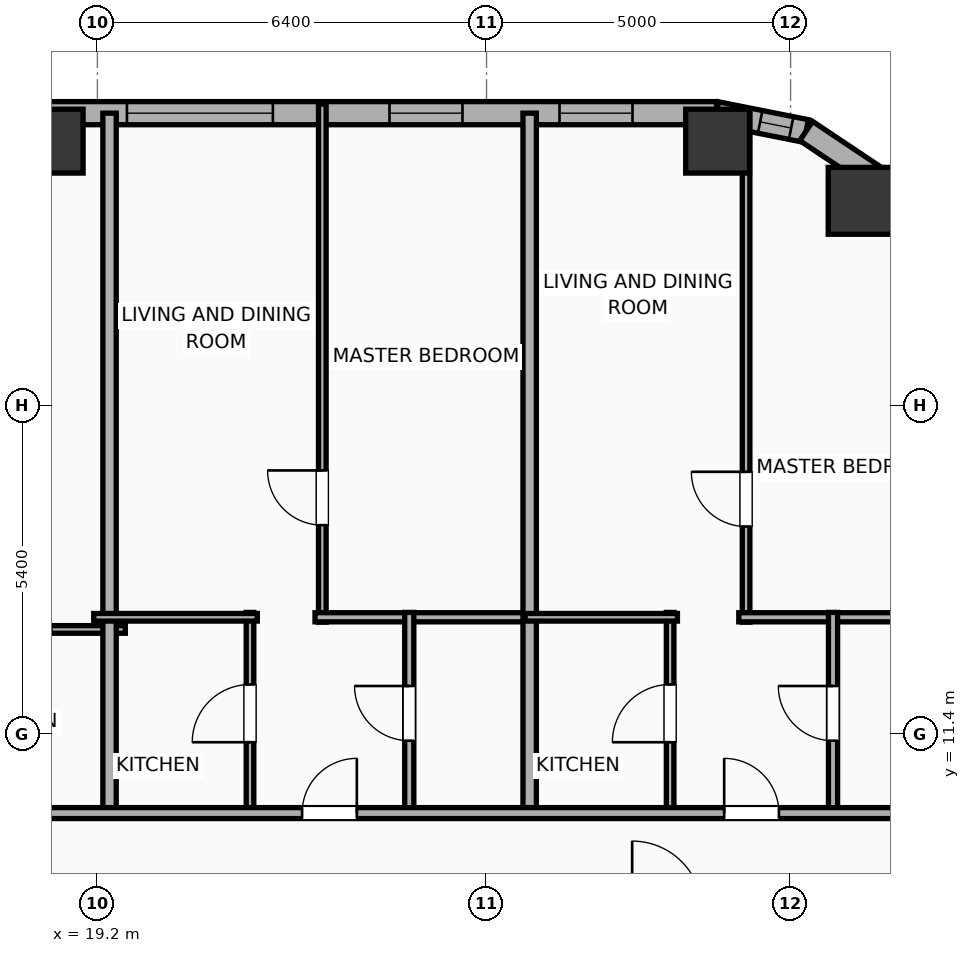
"""IFC4 building model, lengths in metres.
Left out: names, types, materials, properties, quantities, classifications, styles, units other than length and angle.
Written with IfcOpenShell. Run it as: python <this file> out.ifc"""

import sys

from ifc_helpers import new_model, si_unit, direction, frame, frame_2d, origin, origin_2d, place, context, subcontext, project, spatial, rectangle, hollow_rectangle, hollow_circle, extrude, element, fill, save


model = new_model("IFC4")
c1 = context("Model", 3, precision=1e-05, world=origin(), true_north=direction((0.0, 1.0)))
c2 = subcontext(c1, "Body", "Model", "MODEL_VIEW")
j1 = project(units=[si_unit("LENGTHUNIT", "METRE"), si_unit("PLANEANGLEUNIT", "RADIAN")], contexts=[c1])
p1 = place(None, origin())
s1 = spatial("IfcSite", under=j1, at=p1, CompositionType="ELEMENT")
p2 = place(p1, origin())
s2 = spatial("IfcBuilding", under=s1, at=p2, CompositionType="ELEMENT")
p3 = place(p2, frame((0.0, 0.0, 101.4)))
s3 = spatial("IfcBuildingStorey", under=s2, at=p3, CompositionType="ELEMENT", Elevation=101.4)
p4 = place(p3, frame((31.769, 20.169, 0.0), z_axis=(0.0, 0.0, 1.0), x_axis=(1.0, 0.0, 0.0)))
e1 = element("IfcColumn", 1, at=p4, inside=s3, PredefinedType="COLUMN", context=c2, shape_type="SweptSolid", body=[
    extrude(hollow_circle(Radius=0.55, WallThickness=0.036, at=origin_2d()), origin(), (0.0, 0.0, 1.0), 3.9),
])
for number, where, z_axis, x_axis in (
    (2, (29.4, 21.15, 0.0), (0.0, 0.0, 1.0), (1.0, 0.0, 0.0)),
    (3, (18.44, 21.15, 0.0), (0.0, 0.0, 1.0), (1.0, 0.0, 0.0)),
):
    element("IfcColumn", number, at=place(p3, frame(where, z_axis=z_axis, x_axis=x_axis)), inside=s3, PredefinedType="COLUMN", context=c2, shape_type="SweptSolid", body=[
        extrude(hollow_rectangle(XDim=1.05, YDim=1.05, WallThickness=0.036, at=origin_2d()), origin(), (0.0, 0.0, 1.0), 3.9),
    ])
p5 = place(p3, frame((-25.381, 21.61, 0.0), z_axis=(0.0, 0.0, 1.0), x_axis=(1.0, 0.0, 0.0)))
e4 = element("IfcWall", 4, at=p5, inside=s3, PredefinedType="ELEMENTEDWALL", context=c2, shape_type="SweptSolid", body=[
    extrude(rectangle(XDim=54.763, YDim=0.38, at=frame_2d((27.381, 0.0))), origin(), (0.0, 0.0, 1.0), 3.65),
])
p6 = place(p5, frame((45.067, 0.0, 0.75)))
e5 = element("IfcOpeningElement", 5, at=p6, cuts=e4, PredefinedType="OPENING", context=c2, shape_type="SweptSolid", body=[
    extrude(rectangle(XDim=2.4, YDim=2.1, at=frame_2d((1.2, 1.05))), frame((0.0, 0.2, 0.0), z_axis=(0.0, -1.0, 0.0), x_axis=(1.0, 0.0, 0.0)), (0.0, 0.0, 1.0), 0.4),
])
p7 = place(p5, frame((4.076, 0.0, 0.75)))
e6 = element("IfcOpeningElement", 6, at=p7, cuts=e4, PredefinedType="OPENING", context=c2, shape_type="SweptSolid", body=[
    extrude(rectangle(XDim=1.2, YDim=2.05, at=frame_2d((0.6, 1.025))), frame((0.0, 0.2, 0.0), z_axis=(0.0, -1.0, 0.0), x_axis=(1.0, 0.0, 0.0)), (0.0, 0.0, 1.0), 0.4),
])
p8 = place(p5, frame((9.395, 0.0, 0.75)))
e7 = element("IfcOpeningElement", 7, at=p8, cuts=e4, PredefinedType="OPENING", context=c2, shape_type="SweptSolid", body=[
    extrude(rectangle(XDim=0.85, YDim=2.05, at=frame_2d((0.425, 1.025))), frame((0.0, 0.2, 0.0), z_axis=(0.0, -1.0, 0.0), x_axis=(1.0, 0.0, 0.0)), (0.0, 0.0, 1.0), 0.4),
])
p9 = place(p5, frame((7.205, 0.0, 0.75)))
e8 = element("IfcOpeningElement", 8, at=p9, cuts=e4, PredefinedType="OPENING", context=c2, shape_type="SweptSolid", body=[
    extrude(rectangle(XDim=1.2, YDim=2.05, at=frame_2d((0.6, 1.025))), frame((0.0, 0.2, 0.0), z_axis=(0.0, -1.0, 0.0), x_axis=(1.0, 0.0, 0.0)), (0.0, 0.0, 1.0), 0.4),
])
p10 = place(p5, frame((13.676, 0.0, 0.75)))
e9 = element("IfcOpeningElement", 9, at=p10, cuts=e4, PredefinedType="OPENING", context=c2, shape_type="SweptSolid", body=[
    extrude(rectangle(XDim=1.2, YDim=2.05, at=frame_2d((0.6, 1.025))), frame((0.0, 0.2, 0.0), z_axis=(0.0, -1.0, 0.0), x_axis=(1.0, 0.0, 0.0)), (0.0, 0.0, 1.0), 0.4),
])
p11 = place(p5, frame((17.136, 0.0, 0.75)))
e10 = element("IfcOpeningElement", 10, at=p11, cuts=e4, PredefinedType="OPENING", context=c2, shape_type="SweptSolid", body=[
    extrude(rectangle(XDim=1.2, YDim=2.05, at=frame_2d((0.6, 1.025))), frame((0.0, 0.2, 0.0), z_axis=(0.0, -1.0, 0.0), x_axis=(1.0, 0.0, 0.0)), (0.0, 0.0, 1.0), 0.4),
])
p12 = place(p5, frame((22.656, 0.0, 0.75)))
e11 = element("IfcOpeningElement", 11, at=p12, cuts=e4, PredefinedType="OPENING", context=c2, shape_type="SweptSolid", body=[
    extrude(rectangle(XDim=1.2, YDim=2.05, at=frame_2d((0.6, 1.025))), frame((0.0, 0.2, 0.0), z_axis=(0.0, -1.0, 0.0), x_axis=(1.0, 0.0, 0.0)), (0.0, 0.0, 1.0), 0.4),
])
p13 = place(p5, frame((29.443, 0.0, 0.75)))
e12 = element("IfcOpeningElement", 12, at=p13, cuts=e4, PredefinedType="OPENING", context=c2, shape_type="SweptSolid", body=[
    extrude(rectangle(XDim=1.2, YDim=2.05, at=frame_2d((0.6, 1.025))), frame((0.0, 0.2, 0.0), z_axis=(0.0, -1.0, 0.0), x_axis=(1.0, 0.0, 0.0)), (0.0, 0.0, 1.0), 0.4),
])
p14 = place(p5, frame((26.348, 0.0, 0.75)))
e13 = element("IfcOpeningElement", 13, at=p14, cuts=e4, PredefinedType="OPENING", context=c2, shape_type="SweptSolid", body=[
    extrude(rectangle(XDim=1.2, YDim=2.05, at=frame_2d((0.6, 1.025))), frame((0.0, 0.2, 0.0), z_axis=(0.0, -1.0, 0.0), x_axis=(1.0, 0.0, 0.0)), (0.0, 0.0, 1.0), 0.4),
])
p15 = place(p5, frame((33.596, 0.0, 0.75)))
e14 = element("IfcOpeningElement", 14, at=p15, cuts=e4, PredefinedType="OPENING", context=c2, shape_type="SweptSolid", body=[
    extrude(rectangle(XDim=1.2, YDim=2.05, at=frame_2d((0.6, 1.025))), frame((0.0, 0.2, 0.0), z_axis=(0.0, -1.0, 0.0), x_axis=(1.0, 0.0, 0.0)), (0.0, 0.0, 1.0), 0.4),
])
p16 = place(p5, frame((36.014, 0.0, 0.75)))
e15 = element("IfcOpeningElement", 15, at=p16, cuts=e4, PredefinedType="OPENING", context=c2, shape_type="SweptSolid", body=[
    extrude(rectangle(XDim=1.2, YDim=2.05, at=frame_2d((0.6, 1.025))), frame((0.0, 0.2, 0.0), z_axis=(0.0, -1.0, 0.0), x_axis=(1.0, 0.0, 0.0)), (0.0, 0.0, 1.0), 0.4),
])
p17 = place(p5, frame((40.814, 0.0, 0.75)))
e16 = element("IfcOpeningElement", 16, at=p17, cuts=e4, PredefinedType="OPENING", context=c2, shape_type="SweptSolid", body=[
    extrude(rectangle(XDim=1.2, YDim=2.05, at=frame_2d((0.6, 1.025))), frame((0.0, 0.2, 0.0), z_axis=(0.0, -1.0, 0.0), x_axis=(1.0, 0.0, 0.0)), (0.0, 0.0, 1.0), 0.4),
])
p18 = place(p5, frame((49.385, 0.0, 0.75)))
e17 = element("IfcOpeningElement", 17, at=p18, cuts=e4, PredefinedType="OPENING", context=c2, shape_type="SweptSolid", body=[
    extrude(rectangle(XDim=1.2, YDim=2.05, at=frame_2d((0.6, 1.025))), frame((0.0, 0.2, 0.0), z_axis=(0.0, -1.0, 0.0), x_axis=(1.0, 0.0, 0.0)), (0.0, 0.0, 1.0), 0.4),
])
p19 = place(p5, frame((52.181, 0.0, 0.75)))
e18 = element("IfcOpeningElement", 18, at=p19, cuts=e4, PredefinedType="OPENING", context=c2, shape_type="SweptSolid", body=[
    extrude(rectangle(XDim=1.2, YDim=2.05, at=frame_2d((0.6, 1.025))), frame((0.0, 0.2, 0.0), z_axis=(0.0, -1.0, 0.0), x_axis=(1.0, 0.0, 0.0)), (0.0, 0.0, 1.0), 0.4),
])
p20 = place(p3, frame((29.381, 21.61, 0.0), z_axis=(0.0, 0.0, 1.0), x_axis=(0.980755066645, -0.195242155415, 0.0)))
e19 = element("IfcWall", 19, at=p20, inside=s3, PredefinedType="ELEMENTEDWALL", context=c2, shape_type="SweptSolid", body=[
    extrude(rectangle(XDim=1.504, YDim=0.38, at=frame_2d((0.752, 0.0))), origin(), (0.0, 0.0, 1.0), 3.65),
])
p21 = place(p20, frame((0.732, 0.0, 0.75)))
e20 = element("IfcOpeningElement", 20, at=p21, cuts=e19, PredefinedType="OPENING", context=c2, shape_type="SweptSolid", body=[
    extrude(rectangle(XDim=0.52, YDim=2.05, at=frame_2d((0.26, 1.025))), frame((0.0, 0.2, 0.0), z_axis=(0.0, -1.0, 0.0), x_axis=(1.0, 0.0, 0.0)), (0.0, 0.0, 1.0), 0.4),
])
p22 = place(p3, frame((30.857, 21.316, 0.0), z_axis=(0.0, 0.0, 1.0), x_axis=(0.831468045563, -0.555572577804, 0.0)))
e21 = element("IfcWall", 21, at=p22, inside=s3, PredefinedType="ELEMENTEDWALL", context=c2, shape_type="SweptSolid", body=[
    extrude(rectangle(XDim=1.485, YDim=0.38, at=frame_2d((0.742, 0.0))), origin(), (0.0, 0.0, 1.0), 3.65),
])
p23 = place(p3, frame((32.091, 20.491, 0.0), z_axis=(0.0, 0.0, 1.0), x_axis=(0.555610286119, -0.831442848281, 0.0)))
e22 = element("IfcWall", 22, at=p23, inside=s3, PredefinedType="ELEMENTEDWALL", context=c2, shape_type="SweptSolid", body=[
    extrude(rectangle(XDim=1.485, YDim=0.38, at=frame_2d((0.743, 0.0))), origin(), (0.0, 0.0, 1.0), 3.65),
])
p24 = place(p3, frame((16.277, 13.12, 0.0), z_axis=(0.0, 0.0, 1.0), x_axis=(1.0, 0.0, 0.0)))
e23 = element("IfcWall", 23, at=p24, inside=s3, PredefinedType="PARTITIONING", context=c2, shape_type="SweptSolid", body=[
    extrude(rectangle(XDim=3.383, YDim=0.125, at=frame_2d((1.691, 0.0))), origin(), (0.0, 0.0, 1.0), 3.65),
])
p25 = place(p24, frame((1.217, 0.0, 0.0)))
e24 = element("IfcOpeningElement", 24, at=p25, cuts=e23, PredefinedType="OPENING", context=c2, shape_type="SweptSolid", body=[
    extrude(rectangle(XDim=0.95, YDim=2.05, at=frame_2d((0.475, 1.025))), frame((0.0, 0.073, 0.0), z_axis=(0.0, -1.0, 0.0), x_axis=(1.0, 0.0, 0.0)), (0.0, 0.0, 1.0), 0.145),
])
p26 = place(p3, frame((19.4, 10.02, 0.0), z_axis=(0.0, 0.0, 1.0), x_axis=(0.0, 1.0, 0.0)))
e25 = element("IfcWall", 25, at=p26, inside=s3, PredefinedType="PARTITIONING", context=c2, shape_type="SweptSolid", body=[
    extrude(rectangle(XDim=11.59, YDim=0.22, at=frame_2d((5.795, 0.0))), origin(), (0.0, 0.0, 1.0), 3.65),
])
p27 = place(p3, frame((22.899, 13.24, 0.0), z_axis=(0.0, 0.0, 1.0), x_axis=(0.0, 1.0, 0.0)))
e26 = element("IfcWall", 26, at=p27, inside=s3, PredefinedType="PARTITIONING", context=c2, shape_type="SweptSolid", body=[
    extrude(rectangle(XDim=8.52, YDim=0.125, at=frame_2d((4.26, 0.0))), origin(), (0.0, 0.0, 1.0), 3.65),
])
p28 = place(p27, frame((1.595, 0.0, 0.0)))
e27 = element("IfcOpeningElement", 27, at=p28, cuts=e26, PredefinedType="OPENING", context=c2, shape_type="SweptSolid", body=[
    extrude(rectangle(XDim=0.9, YDim=2.05, at=frame_2d((0.45, 1.025))), frame((0.0, 0.073, 0.0), z_axis=(0.0, -1.0, 0.0), x_axis=(1.0, 0.0, 0.0)), (0.0, 0.0, 1.0), 0.145),
])
p29 = place(p3, frame((22.779, 13.32, 0.0), z_axis=(0.0, 0.0, 1.0), x_axis=(1.0, 0.0, 0.0)))
e28 = element("IfcWall", 28, at=p29, inside=s3, PredefinedType="PLUMBINGWALL", context=c2, shape_type="SweptSolid", body=[
    extrude(rectangle(XDim=3.605, YDim=0.15, at=frame_2d((1.802, 0.0))), origin(), (0.0, 0.0, 1.0), 3.65),
])
p30 = place(p3, frame((21.71, 10.08, 0.0), z_axis=(0.0, 0.0, 1.0), x_axis=(0.0, 1.0, 0.0)))
e29 = element("IfcWall", 29, at=p30, inside=s3, PredefinedType="PARTITIONING", context=c2, shape_type="SweptSolid", body=[
    extrude(rectangle(XDim=3.32, YDim=0.125, at=frame_2d((1.66, 0.0))), origin(), (0.0, 0.0, 1.0), 3.65),
])
p31 = place(p30, frame((1.185, 0.0, 0.0)))
e30 = element("IfcOpeningElement", 30, at=p31, cuts=e29, PredefinedType="OPENING", context=c2, shape_type="SweptSolid", body=[
    extrude(rectangle(XDim=0.95, YDim=2.05, at=frame_2d((0.475, 1.025))), frame((0.0, 0.073, 0.0), z_axis=(0.0, -1.0, 0.0), x_axis=(1.0, 0.0, 0.0)), (0.0, 0.0, 1.0), 0.145),
])
p32 = place(p3, frame((19.14, 13.32, 0.0), z_axis=(0.0, 0.0, 1.0), x_axis=(1.0, 0.0, 0.0)))
e31 = element("IfcWall", 31, at=p32, inside=s3, PredefinedType="PARTITIONING", context=c2, shape_type="SweptSolid", body=[
    extrude(rectangle(XDim=2.69, YDim=0.125, at=frame_2d((1.345, 0.0))), origin(), (0.0, 0.0, 1.0), 3.65),
])
p33 = place(p3, frame((24.329, 10.08, 0.0), z_axis=(0.0, 0.0, 1.0), x_axis=(0.0, 1.0, 0.0)))
e32 = element("IfcWall", 32, at=p33, inside=s3, PredefinedType="PLUMBINGWALL", context=c2, shape_type="SweptSolid", body=[
    extrude(rectangle(XDim=3.32, YDim=0.15, at=frame_2d((1.66, 0.0))), origin(), (0.0, 0.0, 1.0), 3.65),
])
p34 = place(p33, frame((1.21, 0.0, 0.0)))
e33 = element("IfcOpeningElement", 33, at=p34, cuts=e32, PredefinedType="OPENING", context=c2, shape_type="SweptSolid", body=[
    extrude(rectangle(XDim=0.9, YDim=2.05, at=frame_2d((0.45, 1.025))), frame((0.0, 0.085, 0.0), z_axis=(0.0, -1.0, 0.0), x_axis=(1.0, 0.0, 0.0)), (0.0, 0.0, 1.0), 0.17),
])
p35 = place(p3, frame((26.309, 10.02, 0.0), z_axis=(0.0, 0.0, 1.0), x_axis=(0.0, 1.0, 0.0)))
e34 = element("IfcWall", 34, at=p35, inside=s3, PredefinedType="PARTITIONING", context=c2, shape_type="SweptSolid", body=[
    extrude(rectangle(XDim=11.59, YDim=0.22, at=frame_2d((5.795, 0.0))), origin(), (0.0, 0.0, 1.0), 3.65),
])
p36 = place(p3, frame((29.868, 13.24, 0.0), z_axis=(0.0, 0.0, 1.0), x_axis=(0.0, 1.0, 0.0)))
e35 = element("IfcWall", 35, at=p36, inside=s3, PredefinedType="PARTITIONING", context=c2, shape_type="SweptSolid", body=[
    extrude(rectangle(XDim=8.426, YDim=0.125, at=frame_2d((4.213, 0.0))), origin(), (0.0, 0.0, 1.0), 3.65),
])
p37 = place(p36, frame((1.572, 0.0, 0.0)))
e36 = element("IfcOpeningElement", 36, at=p37, cuts=e35, PredefinedType="OPENING", context=c2, shape_type="SweptSolid", body=[
    extrude(rectangle(XDim=0.9, YDim=2.05, at=frame_2d((0.45, 1.025))), frame((0.0, 0.073, 0.0), z_axis=(0.0, -1.0, 0.0), x_axis=(1.0, 0.0, 0.0)), (0.0, 0.0, 1.0), 0.145),
])
p38 = place(p3, frame((29.748, 13.32, 0.0), z_axis=(0.0, 0.0, 1.0), x_axis=(1.0, 0.0, 0.0)))
e37 = element("IfcWall", 37, at=p38, inside=s3, PredefinedType="PLUMBINGWALL", context=c2, shape_type="SweptSolid", body=[
    extrude(rectangle(XDim=3.612, YDim=0.15, at=frame_2d((1.806, 0.0))), origin(), (0.0, 0.0, 1.0), 3.65),
])
p39 = place(p3, frame((28.619, 10.08, 0.0), z_axis=(0.0, 0.0, 1.0), x_axis=(0.0, 1.0, 0.0)))
e38 = element("IfcWall", 38, at=p39, inside=s3, PredefinedType="PARTITIONING", context=c2, shape_type="SweptSolid", body=[
    extrude(rectangle(XDim=3.32, YDim=0.125, at=frame_2d((1.66, 0.0))), origin(), (0.0, 0.0, 1.0), 3.65),
])
p40 = place(p39, frame((1.185, 0.0, 0.0)))
e39 = element("IfcOpeningElement", 39, at=p40, cuts=e38, PredefinedType="OPENING", context=c2, shape_type="SweptSolid", body=[
    extrude(rectangle(XDim=0.95, YDim=2.05, at=frame_2d((0.475, 1.025))), frame((0.0, 0.073, 0.0), z_axis=(0.0, -1.0, 0.0), x_axis=(1.0, 0.0, 0.0)), (0.0, 0.0, 1.0), 0.145),
])
p41 = place(p3, frame((26.234, 13.32, 0.0), z_axis=(0.0, 0.0, 1.0), x_axis=(1.0, 0.0, 0.0)))
e40 = element("IfcWall", 40, at=p41, inside=s3, PredefinedType="PARTITIONING", context=c2, shape_type="SweptSolid", body=[
    extrude(rectangle(XDim=2.505, YDim=0.125, at=frame_2d((1.252, 0.0))), origin(), (0.0, 0.0, 1.0), 3.65),
])
p42 = place(p3, frame((31.298, 10.08, 0.0), z_axis=(0.0, 0.0, 1.0), x_axis=(0.0, 1.0, 0.0)))
e41 = element("IfcWall", 41, at=p42, inside=s3, PredefinedType="PLUMBINGWALL", context=c2, shape_type="SweptSolid", body=[
    extrude(rectangle(XDim=3.32, YDim=0.15, at=frame_2d((1.66, 0.0))), origin(), (0.0, 0.0, 1.0), 3.65),
])
p43 = place(p42, frame((1.21, 0.0, 0.0)))
e42 = element("IfcOpeningElement", 42, at=p43, cuts=e41, PredefinedType="OPENING", context=c2, shape_type="SweptSolid", body=[
    extrude(rectangle(XDim=0.9, YDim=2.05, at=frame_2d((0.45, 1.025))), frame((0.0, 0.085, 0.0), z_axis=(0.0, -1.0, 0.0), x_axis=(1.0, 0.0, 0.0)), (0.0, 0.0, 1.0), 0.17),
])
p44 = place(p3, frame((-29.21, 10.1, 0.0), z_axis=(0.0, 0.0, 1.0), x_axis=(1.0, 0.0, 0.0)))
e43 = element("IfcWall", 43, at=p44, inside=s3, PredefinedType="PARTITIONING", context=c2, shape_type="SweptSolid", body=[
    extrude(rectangle(XDim=62.42, YDim=0.18, at=frame_2d((31.21, 0.0))), origin(), (0.0, 0.0, 1.0), 3.65),
])
p45 = place(p44, frame((4.906, 0.0, 0.0)))
e44 = element("IfcOpeningElement", 44, at=p45, cuts=e43, PredefinedType="OPENING", context=c2, shape_type="SweptSolid", body=[
    extrude(rectangle(XDim=1.15, YDim=2.05, at=frame_2d((0.575, 1.025))), frame((0.0, 0.1, 0.0), z_axis=(0.0, -1.0, 0.0), x_axis=(1.0, 0.0, 0.0)), (0.0, 0.0, 1.0), 0.2),
])
p46 = place(p44, frame((14.812, 0.0, 0.0)))
e45 = element("IfcOpeningElement", 45, at=p46, cuts=e43, PredefinedType="OPENING", context=c2, shape_type="SweptSolid", body=[
    extrude(rectangle(XDim=1.15, YDim=2.05, at=frame_2d((0.575, 1.025))), frame((0.0, 0.1, 0.0), z_axis=(0.0, -1.0, 0.0), x_axis=(1.0, 0.0, 0.0)), (0.0, 0.0, 1.0), 0.2),
])
p47 = place(p44, frame((24.406, 0.0, 0.0)))
e46 = element("IfcOpeningElement", 46, at=p47, cuts=e43, PredefinedType="OPENING", context=c2, shape_type="SweptSolid", body=[
    extrude(rectangle(XDim=1.15, YDim=2.05, at=frame_2d((0.575, 1.025))), frame((0.0, 0.1, 0.0), z_axis=(0.0, -1.0, 0.0), x_axis=(1.0, 0.0, 0.0)), (0.0, 0.0, 1.0), 0.2),
])
p48 = place(p44, frame((33.981, 0.0, 0.0)))
e47 = element("IfcOpeningElement", 47, at=p48, cuts=e43, PredefinedType="OPENING", context=c2, shape_type="SweptSolid", body=[
    extrude(rectangle(XDim=1.15, YDim=2.05, at=frame_2d((0.575, 1.025))), frame((0.0, 0.1, 0.0), z_axis=(0.0, -1.0, 0.0), x_axis=(1.0, 0.0, 0.0)), (0.0, 0.0, 1.0), 0.2),
])
p49 = place(p44, frame((43.138, 0.0, 0.0)))
e48 = element("IfcOpeningElement", 48, at=p49, cuts=e43, PredefinedType="OPENING", context=c2, shape_type="SweptSolid", body=[
    extrude(rectangle(XDim=1.15, YDim=2.05, at=frame_2d((0.575, 1.025))), frame((0.0, 0.1, 0.0), z_axis=(0.0, -1.0, 0.0), x_axis=(1.0, 0.0, 0.0)), (0.0, 0.0, 1.0), 0.2),
])
p50 = place(p44, frame((51.777, 0.0, 0.0)))
e49 = element("IfcOpeningElement", 49, at=p50, cuts=e43, PredefinedType="OPENING", context=c2, shape_type="SweptSolid", body=[
    extrude(rectangle(XDim=0.9, YDim=2.05, at=frame_2d((0.45, 1.025))), frame((0.0, 0.1, 0.0), z_axis=(0.0, -1.0, 0.0), x_axis=(1.0, 0.0, 0.0)), (0.0, 0.0, 1.0), 0.2),
])
p51 = place(p44, frame((58.718, 0.0, 0.0)))
e50 = element("IfcOpeningElement", 50, at=p51, cuts=e43, PredefinedType="OPENING", context=c2, shape_type="SweptSolid", body=[
    extrude(rectangle(XDim=0.9, YDim=2.05, at=frame_2d((0.45, 1.025))), frame((0.0, 0.1, 0.0), z_axis=(0.0, -1.0, 0.0), x_axis=(1.0, 0.0, 0.0)), (0.0, 0.0, 1.0), 0.2),
])
p52 = place(p6, origin())
e51 = element("IfcWindow", 51, at=p52, inside=s3, PartitioningType="SINGLE_PANEL", PredefinedType="WINDOW", context=c2, shape_type="SweptSolid", body=[
    extrude(rectangle(XDim=2.4, YDim=2.1, at=frame_2d((1.2, 1.05))), frame((0.0, 0.03, 0.0), z_axis=(0.0, -1.0, 0.0), x_axis=(1.0, 0.0, 0.0)), (0.0, 0.0, 1.0), 0.06),
])
fill(e5, e51)
p53 = place(p18, origin())
e52 = element("IfcWindow", 52, at=p53, inside=s3, PartitioningType="SINGLE_PANEL", PredefinedType="WINDOW", context=c2, shape_type="SweptSolid", body=[
    extrude(rectangle(XDim=1.2, YDim=2.05, at=frame_2d((0.6, 1.025))), frame((0.0, 0.03, 0.0), z_axis=(0.0, -1.0, 0.0), x_axis=(1.0, 0.0, 0.0)), (0.0, 0.0, 1.0), 0.06),
])
fill(e17, e52)
p54 = place(p19, origin())
e53 = element("IfcWindow", 53, at=p54, inside=s3, PartitioningType="SINGLE_PANEL", PredefinedType="WINDOW", context=c2, shape_type="SweptSolid", body=[
    extrude(rectangle(XDim=1.2, YDim=2.05, at=frame_2d((0.6, 1.025))), frame((0.0, 0.03, 0.0), z_axis=(0.0, -1.0, 0.0), x_axis=(1.0, 0.0, 0.0)), (0.0, 0.0, 1.0), 0.06),
])
fill(e18, e53)
p55 = place(p21, origin())
e54 = element("IfcWindow", 54, at=p55, inside=s3, PartitioningType="SINGLE_PANEL", PredefinedType="WINDOW", context=c2, shape_type="SweptSolid", body=[
    extrude(rectangle(XDim=0.52, YDim=2.05, at=frame_2d((0.26, 1.025))), frame((0.0, 0.03, 0.0), z_axis=(0.0, -1.0, 0.0), x_axis=(1.0, 0.0, 0.0)), (0.0, 0.0, 1.0), 0.06),
])
fill(e20, e54)
p56 = place(p28, origin())
e55 = element("IfcDoor", 55, at=p56, inside=s3, OperationType="SINGLE_SWING_RIGHT", PredefinedType="DOOR", context=c2, shape_type="SweptSolid", body=[
    extrude(rectangle(XDim=0.9, YDim=2.05, at=frame_2d((0.45, 1.025))), frame((0.0, 0.025, 0.0), z_axis=(0.0, -1.0, 0.0), x_axis=(1.0, 0.0, 0.0)), (0.0, 0.0, 1.0), 0.05),
])
fill(e27, e55)
p57 = place(p31, origin())
e56 = element("IfcDoor", 56, at=p57, inside=s3, OperationType="SINGLE_SWING_LEFT", PredefinedType="DOOR", context=c2, shape_type="SweptSolid", body=[
    extrude(rectangle(XDim=0.95, YDim=2.05, at=frame_2d((0.475, 1.025))), frame((0.0, 0.025, 0.0), z_axis=(0.0, -1.0, 0.0), x_axis=(1.0, 0.0, 0.0)), (0.0, 0.0, 1.0), 0.05),
])
fill(e30, e56)
p58 = place(p34, origin())
e57 = element("IfcDoor", 57, at=p58, inside=s3, OperationType="SINGLE_SWING_RIGHT", PredefinedType="DOOR", context=c2, shape_type="SweptSolid", body=[
    extrude(rectangle(XDim=0.9, YDim=2.05, at=frame_2d((0.45, 1.025))), frame((0.0, 0.025, 0.0), z_axis=(0.0, -1.0, 0.0), x_axis=(1.0, 0.0, 0.0)), (0.0, 0.0, 1.0), 0.05),
])
fill(e33, e57)
p59 = place(p37, origin())
e58 = element("IfcDoor", 58, at=p59, inside=s3, OperationType="SINGLE_SWING_RIGHT", PredefinedType="DOOR", context=c2, shape_type="SweptSolid", body=[
    extrude(rectangle(XDim=0.9, YDim=2.05, at=frame_2d((0.45, 1.025))), frame((0.0, 0.025, 0.0), z_axis=(0.0, -1.0, 0.0), x_axis=(1.0, 0.0, 0.0)), (0.0, 0.0, 1.0), 0.05),
])
fill(e36, e58)
p60 = place(p40, origin())
e59 = element("IfcDoor", 59, at=p60, inside=s3, OperationType="SINGLE_SWING_LEFT", PredefinedType="DOOR", context=c2, shape_type="SweptSolid", body=[
    extrude(rectangle(XDim=0.95, YDim=2.05, at=frame_2d((0.475, 1.025))), frame((0.0, 0.025, 0.0), z_axis=(0.0, -1.0, 0.0), x_axis=(1.0, 0.0, 0.0)), (0.0, 0.0, 1.0), 0.05),
])
fill(e39, e59)
p61 = place(p43, origin())
e60 = element("IfcDoor", 60, at=p61, inside=s3, OperationType="SINGLE_SWING_RIGHT", PredefinedType="DOOR", context=c2, shape_type="SweptSolid", body=[
    extrude(rectangle(XDim=0.9, YDim=2.05, at=frame_2d((0.45, 1.025))), frame((0.0, 0.025, 0.0), z_axis=(0.0, -1.0, 0.0), x_axis=(1.0, 0.0, 0.0)), (0.0, 0.0, 1.0), 0.05),
])
fill(e42, e60)
p62 = place(p50, origin())
e61 = element("IfcDoor", 61, at=p62, inside=s3, OperationType="SINGLE_SWING_RIGHT", PredefinedType="DOOR", context=c2, shape_type="SweptSolid", body=[
    extrude(rectangle(XDim=0.9, YDim=2.05, at=frame_2d((0.45, 1.025))), frame((0.0, 0.025, 0.0), z_axis=(0.0, -1.0, 0.0), x_axis=(1.0, 0.0, 0.0)), (0.0, 0.0, 1.0), 0.05),
])
fill(e49, e61)
p63 = place(p51, origin())
e62 = element("IfcDoor", 62, at=p63, inside=s3, OperationType="SINGLE_SWING_LEFT", PredefinedType="DOOR", context=c2, shape_type="SweptSolid", body=[
    extrude(rectangle(XDim=0.9, YDim=2.05, at=frame_2d((0.45, 1.025))), frame((0.0, 0.025, 0.0), z_axis=(0.0, -1.0, 0.0), x_axis=(1.0, 0.0, 0.0)), (0.0, 0.0, 1.0), 0.05),
])
fill(e50, e62)
save(model, sys.argv[1])
